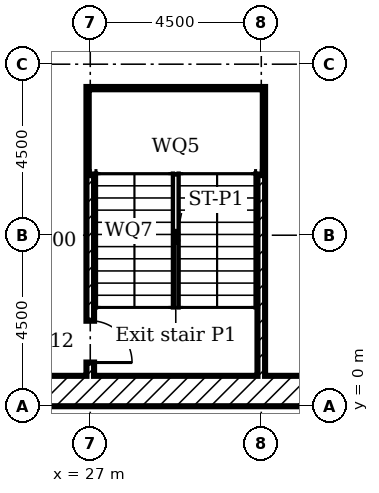
"""IFC4 building model, lengths in metres.
Left out: names, types, materials, properties, quantities, classifications, styles, units other than length and angle.
Written with IfcOpenShell. Run it as: python <this file> out.ifc"""

import sys

from ifc_helpers import new_model, si_unit, direction, frame, frame_2d, origin, place, context, subcontext, project, spatial, rectangle, extrude, element, fill, save


model = new_model("IFC4")
c1 = context("Model", 3, precision=1e-05, world=origin(), true_north=direction((0.0, 1.0)))
c2 = subcontext(c1, "Body", "Model", "MODEL_VIEW")
j1 = project(units=[si_unit("LENGTHUNIT", "METRE"), si_unit("PLANEANGLEUNIT", "RADIAN")], contexts=[c1])
p1 = place(None, origin())
s1 = spatial("IfcSite", under=j1, at=p1, CompositionType="ELEMENT")
p2 = place(p1, origin())
s2 = spatial("IfcBuilding", under=s1, at=p2, CompositionType="ELEMENT")
p3 = place(p2, frame((0.0, 0.0, -8.0)))
s3 = spatial("IfcBuildingStorey", under=s2, at=p3, CompositionType="ELEMENT", Elevation=-8.0)
p4 = place(p3, frame((0.0, 0.4, 0.0)))
e1 = element("IfcWall", 1, at=p4, inside=s3, PredefinedType="SOLIDWALL", context=c2, shape_type="SweptSolid", body=[
    extrude(rectangle(XDim=153.0, YDim=0.8, at=frame_2d((76.5, 0.0))), origin(), (0.0, 0.0, 1.0), 4.0),
])
p5 = place(p3, frame((27.0, 0.8, 0.0), z_axis=(0.0, 0.0, 1.0), x_axis=(0.0, 1.0, 0.0)))
e2 = element("IfcWall", 2, at=p5, inside=s3, PredefinedType="SOLIDWALL", context=c2, shape_type="SweptSolid", body=[
    extrude(rectangle(XDim=7.6, YDim=0.2, at=frame_2d((3.8, 0.0))), origin(), (0.0, 0.0, 1.0), 3.55),
])
p6 = place(p5, frame((0.35, 0.0, 0.0)))
e3 = element("IfcOpeningElement", 3, at=p6, cuts=e2, PredefinedType="OPENING", context=c2, shape_type="SweptSolid", body=[
    extrude(rectangle(XDim=1.1, YDim=2.1, at=frame_2d((0.55, 1.05))), frame((0.0, 0.11, 0.0), z_axis=(0.0, -1.0, 0.0), x_axis=(1.0, 0.0, 0.0)), (0.0, 0.0, 1.0), 0.22),
])
p7 = place(p3, frame((31.5, 0.8, 0.0), z_axis=(0.0, 0.0, 1.0), x_axis=(0.0, 1.0, 0.0)))
e4 = element("IfcWall", 4, at=p7, inside=s3, PredefinedType="SOLIDWALL", context=c2, shape_type="SweptSolid", body=[
    extrude(rectangle(XDim=7.6, YDim=0.2, at=frame_2d((3.8, 0.0))), origin(), (0.0, 0.0, 1.0), 3.55),
])
p8 = place(p3, frame((27.1, 8.3, 0.0)))
e5 = element("IfcWall", 5, at=p8, inside=s3, PredefinedType="SOLIDWALL", context=c2, shape_type="SweptSolid", body=[
    extrude(rectangle(XDim=4.3, YDim=0.2, at=frame_2d((2.15, 0.0))), origin(), (0.0, 0.0, 1.0), 3.55),
])
for number, where in (
    (6, (27.1, 6.22, 0.0)),
    (7, (27.1, 7.6, 0.0)),
):
    element("IfcWall", number, at=place(p3, frame(where)), inside=s3, PredefinedType="SOLIDWALL", context=c2, shape_type="SweptSolid", body=[
        extrude(rectangle(XDim=4.3, YDim=0.2, at=frame_2d((2.15, 0.0))), origin(), (0.0, 0.0, 1.0), 1.8),
    ])
p9 = place(p6, frame((1.1, 0.0, 0.0), x_axis=(-1.0, 0.0, 0.0)))
e8 = element("IfcDoor", 8, at=p9, inside=s3, OperationType="SINGLE_SWING_LEFT", PredefinedType="DOOR", context=c2, shape_type="SweptSolid", body=[
    extrude(rectangle(XDim=1.1, YDim=2.1, at=frame_2d((0.55, 1.05))), frame((0.0, 0.025, 0.0), z_axis=(0.0, -1.0, 0.0), x_axis=(1.0, 0.0, 0.0)), (0.0, 0.0, 1.0), 0.05),
])
fill(e3, e8)
save(model, sys.argv[1])
